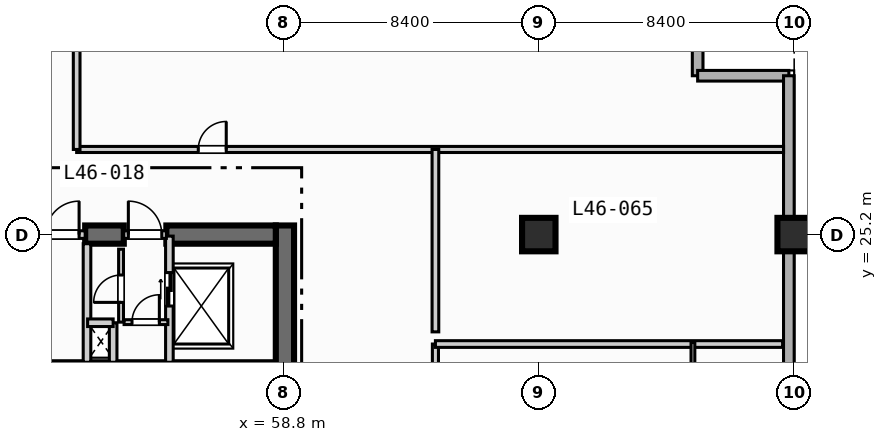
"""IFC4 building model, lengths in metres.
Left out: names, types, materials, properties, quantities, classifications, styles, units other than length and angle.
Written with IfcOpenShell. Run it as: python <this file> out.ifc"""

import sys

from ifc_helpers import new_model, si_unit, direction, frame, frame_2d, origin, origin_2d, place, context, subcontext, project, spatial, rectangle, extrude, element, fill, save


model = new_model("IFC4")
c1 = context("Model", 3, precision=1e-05, world=origin(), true_north=direction((0.0, 1.0)))
c2 = subcontext(c1, "Body", "Model", "MODEL_VIEW")
j1 = project(units=[si_unit("LENGTHUNIT", "METRE"), si_unit("PLANEANGLEUNIT", "RADIAN")], contexts=[c1])
p1 = place(None, origin())
s1 = spatial("IfcSite", under=j1, at=p1, CompositionType="ELEMENT")
p2 = place(p1, origin())
s2 = spatial("IfcBuilding", under=s1, at=p2, CompositionType="ELEMENT")
p3 = place(p2, frame((0.0, 0.0, 190.2)))
s3 = spatial("IfcBuildingStorey", under=s2, at=p3, CompositionType="ELEMENT", Elevation=190.2)
p4 = place(p3, frame((58.85, 20.5, 0.0), z_axis=(0.0, 0.0, 1.0), x_axis=(0.0, 1.0, 0.0)))
e1 = element("IfcWall", 1, at=p4, inside=s3, PredefinedType="SHEAR", context=c2, shape_type="SweptSolid", body=[
    extrude(rectangle(XDim=5.0, YDim=0.6, at=frame_2d((2.5, 0.0))), origin(), (0.0, 0.0, 1.0), 3.47),
])
p5 = place(p3, frame((52.28, 25.2, 0.0), z_axis=(0.0, 0.0, 1.0), x_axis=(1.0, 0.0, 0.0)))
e2 = element("IfcWall", 2, at=p5, inside=s3, PredefinedType="SHEAR", context=c2, shape_type="SweptSolid", body=[
    extrude(rectangle(XDim=1.27, YDim=0.6, at=frame_2d((0.635, 0.0))), origin(), (0.0, 0.0, 1.0), 3.47),
])
p6 = place(p3, frame((54.95, 25.2, 0.0), z_axis=(0.0, 0.0, 1.0), x_axis=(1.0, 0.0, 0.0)))
e3 = element("IfcWall", 3, at=p6, inside=s3, PredefinedType="SHEAR", context=c2, shape_type="SweptSolid", body=[
    extrude(rectangle(XDim=3.6, YDim=0.6, at=frame_2d((1.8, 0.0))), origin(), (0.0, 0.0, 1.0), 3.47),
])
for number, where, z_axis, x_axis in (
    (4, (67.2, 25.2, 0.0), (0.0, 0.0, 1.0), (1.0, 0.0, 0.0)),
    (5, (75.6, 25.2, 0.0), (0.0, 0.0, 1.0), (1.0, 0.0, 0.0)),
):
    element("IfcColumn", number, at=place(p3, frame(where, z_axis=z_axis, x_axis=x_axis)), inside=s3, PredefinedType="COLUMN", context=c2, shape_type="SweptSolid", body=[
        extrude(rectangle(XDim=1.1, YDim=1.1, at=origin_2d()), origin(), (0.0, 0.0, 1.0), 3.7),
    ])
for number, where, z_axis, x_axis in (
    (6, (72.425, 33.425, 0.0), (0.0, 0.0, 1.0), (0.0, -1.0, 0.0)),
    (7, (72.425, 30.425, 0.0), (0.0, 0.0, 1.0), (1.0, 0.0, 0.0)),
):
    element("IfcWall", number, at=place(p3, frame(where, z_axis=z_axis, x_axis=x_axis)), inside=s3, PredefinedType="STANDARD", context=c2, shape_type="SweptSolid", body=[
        extrude(rectangle(XDim=3.0, YDim=0.35, at=frame_2d((1.5, 0.0))), origin(), (0.0, 0.0, 1.0), 3.47),
    ])
p7 = place(p3, frame((75.425, 30.425, 0.0), z_axis=(0.0, 0.0, 1.0), x_axis=(0.0, -1.0, 0.0)))
e8 = element("IfcWall", 8, at=p7, inside=s3, PredefinedType="STANDARD", context=c2, shape_type="SweptSolid", body=[
    extrude(rectangle(XDim=27.25, YDim=0.35, at=frame_2d((13.625, 0.0))), origin(), (0.0, 0.0, 1.0), 3.47),
])
p8 = place(p7, frame((16.625, 0.0, 0.85)))
e9 = element("IfcOpeningElement", 9, at=p8, cuts=e8, PredefinedType="OPENING", context=c2, shape_type="SweptSolid", body=[
    extrude(rectangle(XDim=2.4, YDim=1.95, at=frame_2d((1.2, 0.975))), frame((0.0, 0.185, 0.0), z_axis=(0.0, -1.0, 0.0), x_axis=(1.0, 0.0, 0.0)), (0.0, 0.0, 1.0), 0.37),
])
p9 = place(p3, frame((50.8, 25.2, 0.0), z_axis=(0.0, 0.0, 1.0), x_axis=(1.0, 0.0, 0.0)))
e10 = element("IfcWall", 10, at=p9, inside=s3, PredefinedType="SOLIDWALL", context=c2, shape_type="SweptSolid", body=[
    extrude(rectangle(XDim=1.48, YDim=0.25, at=frame_2d((0.74, 0.0))), origin(), (0.0, 0.0, 1.0), 3.47),
])
p10 = place(p9, frame((0.18, 0.0, 0.0)))
e11 = element("IfcOpeningElement", 11, at=p10, cuts=e10, PredefinedType="OPENING", context=c2, shape_type="SweptSolid", body=[
    extrude(rectangle(XDim=1.1, YDim=2.15, at=frame_2d((0.55, 1.075))), frame((0.0, 0.135, 0.0), z_axis=(0.0, -1.0, 0.0), x_axis=(1.0, 0.0, 0.0)), (0.0, 0.0, 1.0), 0.27),
])
p11 = place(p3, frame((52.34, 21.0, 0.0), z_axis=(0.0, 0.0, 1.0), x_axis=(0.0, 1.0, 0.0)))
e12 = element("IfcWall", 12, at=p11, inside=s3, PredefinedType="SOLIDWALL", context=c2, shape_type="SweptSolid", body=[
    extrude(rectangle(XDim=3.9, YDim=0.25, at=frame_2d((1.95, 0.0))), origin(), (0.0, 0.0, 1.0), 3.47),
])
p12 = place(p3, frame((55.05, 21.0, 0.0), z_axis=(0.0, 0.0, 1.0), x_axis=(0.0, 1.0, 0.0)))
e13 = element("IfcWall", 13, at=p12, inside=s3, PredefinedType="SOLIDWALL", context=c2, shape_type="SweptSolid", body=[
    extrude(rectangle(XDim=4.15, YDim=0.25, at=frame_2d((2.075, 0.0))), origin(), (0.0, 0.0, 1.0), 3.47),
])
p13 = place(p12, frame((1.85, 0.0, 0.0)))
e14 = element("IfcOpeningElement", 14, at=p13, cuts=e13, PredefinedType="OPENING", context=c2, shape_type="SweptSolid", body=[
    extrude(rectangle(XDim=1.1, YDim=2.15, at=frame_2d((0.55, 1.075))), frame((0.0, 0.135, 0.0), z_axis=(0.0, -1.0, 0.0), x_axis=(1.0, 0.0, 0.0)), (0.0, 0.0, 1.0), 0.27),
])
p14 = place(p3, frame((53.55, 25.2, 0.0), z_axis=(0.0, 0.0, 1.0), x_axis=(1.0, 0.0, 0.0)))
e15 = element("IfcWall", 15, at=p14, inside=s3, PredefinedType="SOLIDWALL", context=c2, shape_type="SweptSolid", body=[
    extrude(rectangle(XDim=1.4, YDim=0.25, at=frame_2d((0.7, 0.0))), origin(), (0.0, 0.0, 1.0), 3.47),
])
p15 = place(p14, frame((0.15, 0.0, 0.0)))
e16 = element("IfcOpeningElement", 16, at=p15, cuts=e15, PredefinedType="OPENING", context=c2, shape_type="SweptSolid", body=[
    extrude(rectangle(XDim=1.1, YDim=2.15, at=frame_2d((0.55, 1.075))), frame((0.0, 0.135, 0.0), z_axis=(0.0, -1.0, 0.0), x_axis=(1.0, 0.0, 0.0)), (0.0, 0.0, 1.0), 0.27),
])
p16 = place(p3, frame((53.2, 21.0, 0.0), z_axis=(0.0, 0.0, 1.0), x_axis=(0.0, 1.0, 0.0)))
e17 = element("IfcWall", 17, at=p16, inside=s3, PredefinedType="SOLIDWALL", context=c2, shape_type="SweptSolid", body=[
    extrude(rectangle(XDim=1.3, YDim=0.25, at=frame_2d((0.65, 0.0))), origin(), (0.0, 0.0, 1.0), 3.47),
])
p17 = place(p3, frame((52.36, 22.3, 0.0), z_axis=(0.0, 0.0, 1.0), x_axis=(1.0, 0.0, 0.0)))
e18 = element("IfcWall", 18, at=p17, inside=s3, PredefinedType="SOLIDWALL", context=c2, shape_type="SweptSolid", body=[
    extrude(rectangle(XDim=0.84, YDim=0.25, at=frame_2d((0.42, 0.0))), origin(), (0.0, 0.0, 1.0), 3.47),
])
p18 = place(p3, frame((53.56, 22.32, 0.0), z_axis=(0.0, 0.0, 1.0), x_axis=(1.0, 0.0, 0.0)))
e19 = element("IfcWall", 19, at=p18, inside=s3, PredefinedType="PARTITIONING", context=c2, shape_type="SweptSolid", body=[
    extrude(rectangle(XDim=1.44, YDim=0.16, at=frame_2d((0.72, 0.0))), origin(), (0.0, 0.0, 1.0), 3.47),
])
p19 = place(p18, frame((0.26, 0.0, 0.0)))
e20 = element("IfcOpeningElement", 20, at=p19, cuts=e19, PredefinedType="OPENING", context=c2, shape_type="SweptSolid", body=[
    extrude(rectangle(XDim=0.9, YDim=2.1, at=frame_2d((0.45, 1.05))), frame((0.0, 0.09, 0.0), z_axis=(0.0, -1.0, 0.0), x_axis=(1.0, 0.0, 0.0)), (0.0, 0.0, 1.0), 0.18),
])
p20 = place(p3, frame((53.46, 22.32, 0.0), z_axis=(0.0, 0.0, 1.0), x_axis=(0.0, 1.0, 0.0)))
e21 = element("IfcWall", 21, at=p20, inside=s3, PredefinedType="PARTITIONING", context=c2, shape_type="SweptSolid", body=[
    extrude(rectangle(XDim=2.4, YDim=0.16, at=frame_2d((1.2, 0.0))), origin(), (0.0, 0.0, 1.0), 3.47),
])
p21 = place(p20, frame((0.65, 0.0, 0.0)))
e22 = element("IfcOpeningElement", 22, at=p21, cuts=e21, PredefinedType="OPENING", context=c2, shape_type="SweptSolid", body=[
    extrude(rectangle(XDim=0.9, YDim=2.1, at=frame_2d((0.45, 1.05))), frame((0.0, 0.09, 0.0), z_axis=(0.0, -1.0, 0.0), x_axis=(1.0, 0.0, 0.0)), (0.0, 0.0, 1.0), 0.18),
])
p22 = place(p3, frame((63.8, 3.4, 0.0), z_axis=(0.0, 0.0, 1.0), x_axis=(0.0, 1.0, 0.0)))
e23 = element("IfcWall", 23, at=p22, inside=s3, PredefinedType="PARTITIONING", context=c2, shape_type="SweptSolid", body=[
    extrude(rectangle(XDim=18.2, YDim=0.2, at=frame_2d((9.1, 0.0))), origin(), (0.0, 0.0, 1.0), 3.47),
])
p23 = place(p22, frame((6.2, 0.0, 0.0)))
e24 = element("IfcOpeningElement", 24, at=p23, cuts=e23, PredefinedType="OPENING", context=c2, shape_type="SweptSolid", body=[
    extrude(rectangle(XDim=1.0, YDim=2.15, at=frame_2d((0.5, 1.075))), frame((0.0, 0.11, 0.0), z_axis=(0.0, -1.0, 0.0), x_axis=(1.0, 0.0, 0.0)), (0.0, 0.0, 1.0), 0.22),
])
p24 = place(p3, frame((63.8, 21.6, 0.0), z_axis=(0.0, 0.0, 1.0), x_axis=(1.0, 0.0, 0.0)))
e25 = element("IfcWall", 25, at=p24, inside=s3, PredefinedType="PARTITIONING", context=c2, shape_type="SweptSolid", body=[
    extrude(rectangle(XDim=11.42, YDim=0.22, at=frame_2d((5.71, 0.0))), origin(), (0.0, 0.0, 1.0), 3.47),
])
p25 = place(p3, frame((72.27, 3.25, 0.0), z_axis=(0.0, 0.0, 1.0), x_axis=(0.0, 1.0, 0.0)))
e26 = element("IfcWall", 26, at=p25, inside=s3, PredefinedType="PARTITIONING", context=c2, shape_type="SweptSolid", body=[
    extrude(rectangle(XDim=18.4, YDim=0.125, at=frame_2d((9.2, 0.0))), origin(), (0.0, 0.0, 1.0), 3.47),
])
p26 = place(p25, frame((8.19, 0.0, 0.0)))
e27 = element("IfcOpeningElement", 27, at=p26, cuts=e26, PredefinedType="OPENING", context=c2, shape_type="SweptSolid", body=[
    extrude(rectangle(XDim=0.92, YDim=2.1, at=frame_2d((0.46, 1.05))), frame((0.0, 0.073, 0.0), z_axis=(0.0, -1.0, 0.0), x_axis=(1.0, 0.0, 0.0)), (0.0, 0.0, 1.0), 0.145),
])
p27 = place(p3, frame((52.0, 28.0, 0.0), z_axis=(0.0, 0.0, 1.0), x_axis=(1.0, 0.0, 0.0)))
e28 = element("IfcWall", 28, at=p27, inside=s3, PredefinedType="PARTITIONING", context=c2, shape_type="SweptSolid", body=[
    extrude(rectangle(XDim=23.25, YDim=0.2, at=frame_2d((11.625, 0.0))), origin(), (0.0, 0.0, 1.0), 3.47),
])
p28 = place(p27, frame((4.0, 0.0, 0.0)))
e29 = element("IfcOpeningElement", 29, at=p28, cuts=e28, PredefinedType="OPENING", context=c2, shape_type="SweptSolid", body=[
    extrude(rectangle(XDim=0.92, YDim=2.1, at=frame_2d((0.46, 1.05))), frame((0.0, 0.11, 0.0), z_axis=(0.0, -1.0, 0.0), x_axis=(1.0, 0.0, 0.0)), (0.0, 0.0, 1.0), 0.22),
])
p29 = place(p3, frame((52.0, 28.0, 0.0), z_axis=(0.0, 0.0, 1.0), x_axis=(0.0, 1.0, 0.0)))
e30 = element("IfcWall", 30, at=p29, inside=s3, PredefinedType="PARTITIONING", context=c2, shape_type="SweptSolid", body=[
    extrude(rectangle(XDim=5.3, YDim=0.22, at=frame_2d((2.65, 0.0))), origin(), (0.0, 0.0, 1.0), 3.47),
])
p30 = place(p3, frame((63.8, 22.0, 0.0), z_axis=(0.0, 0.0, 1.0), x_axis=(0.0, 1.0, 0.0)))
e31 = element("IfcWall", 31, at=p30, inside=s3, PredefinedType="PARTITIONING", context=c2, shape_type="SweptSolid", body=[
    extrude(rectangle(XDim=6.0, YDim=0.22, at=frame_2d((3.0, 0.0))), origin(), (0.0, 0.0, 1.0), 3.47),
])
p31 = place(p10, origin())
e32 = element("IfcDoor", 32, at=p31, inside=s3, OperationType="SINGLE_SWING_RIGHT", PredefinedType="DOOR", context=c2, shape_type="SweptSolid", body=[
    extrude(rectangle(XDim=1.1, YDim=2.15, at=frame_2d((0.55, 1.075))), frame((0.0, 0.025, 0.0), z_axis=(0.0, -1.0, 0.0), x_axis=(1.0, 0.0, 0.0)), (0.0, 0.0, 1.0), 0.05),
])
fill(e11, e32)
p32 = place(p13, origin())
e33 = element("IfcDoor", 33, at=p32, inside=s3, OperationType="SLIDING_TO_LEFT", PredefinedType="DOOR", context=c2, shape_type="SweptSolid", body=[
    extrude(rectangle(XDim=1.1, YDim=2.15, at=frame_2d((0.55, 1.075))), frame((0.0, 0.025, 0.0), z_axis=(0.0, -1.0, 0.0), x_axis=(1.0, 0.0, 0.0)), (0.0, 0.0, 1.0), 0.05),
])
fill(e14, e33)
p33 = place(p15, origin())
e34 = element("IfcDoor", 34, at=p33, inside=s3, OperationType="SINGLE_SWING_LEFT", PredefinedType="DOOR", context=c2, shape_type="SweptSolid", body=[
    extrude(rectangle(XDim=1.1, YDim=2.15, at=frame_2d((0.55, 1.075))), frame((0.0, 0.025, 0.0), z_axis=(0.0, -1.0, 0.0), x_axis=(1.0, 0.0, 0.0)), (0.0, 0.0, 1.0), 0.05),
])
fill(e16, e34)
p34 = place(p19, origin())
e35 = element("IfcDoor", 35, at=p34, inside=s3, OperationType="SINGLE_SWING_RIGHT", PredefinedType="DOOR", context=c2, shape_type="SweptSolid", body=[
    extrude(rectangle(XDim=0.9, YDim=2.1, at=frame_2d((0.45, 1.05))), frame((0.0, 0.025, 0.0), z_axis=(0.0, -1.0, 0.0), x_axis=(1.0, 0.0, 0.0)), (0.0, 0.0, 1.0), 0.05),
])
fill(e20, e35)
p35 = place(p21, origin())
e36 = element("IfcDoor", 36, at=p35, inside=s3, OperationType="SINGLE_SWING_LEFT", PredefinedType="DOOR", context=c2, shape_type="SweptSolid", body=[
    extrude(rectangle(XDim=0.9, YDim=2.1, at=frame_2d((0.45, 1.05))), frame((0.0, 0.025, 0.0), z_axis=(0.0, -1.0, 0.0), x_axis=(1.0, 0.0, 0.0)), (0.0, 0.0, 1.0), 0.05),
])
fill(e22, e36)
p36 = place(p28, origin())
e37 = element("IfcDoor", 37, at=p36, inside=s3, OperationType="SINGLE_SWING_RIGHT", PredefinedType="DOOR", context=c2, shape_type="SweptSolid", body=[
    extrude(rectangle(XDim=0.92, YDim=2.1, at=frame_2d((0.46, 1.05))), frame((0.0, 0.025, 0.0), z_axis=(0.0, -1.0, 0.0), x_axis=(1.0, 0.0, 0.0)), (0.0, 0.0, 1.0), 0.05),
])
fill(e29, e37)
save(model, sys.argv[1])
